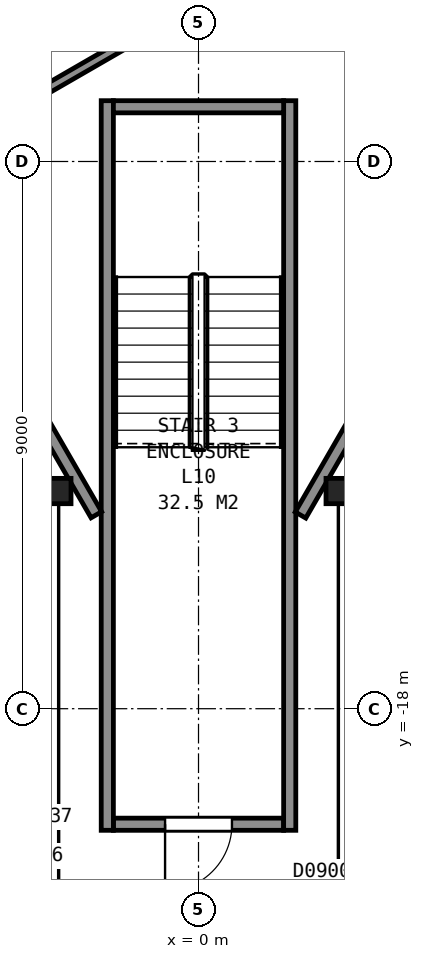
"""IFC4 building model, lengths in metres.
Left out: names, types, materials, properties, quantities, classifications, styles, units other than length and angle.
Written with IfcOpenShell. Run it as: python <this file> out.ifc"""

import sys

from ifc_helpers import new_model, si_unit, direction, frame, frame_2d, origin, origin_2d, place, context, subcontext, project, spatial, rectangle, i_section, extrude, element, fill, save


model = new_model("IFC4")
c1 = context("Model", 3, precision=1e-05, world=origin(), true_north=direction((0.0, 1.0)))
c2 = subcontext(c1, "Body", "Model", "MODEL_VIEW")
j1 = project(units=[si_unit("LENGTHUNIT", "METRE"), si_unit("PLANEANGLEUNIT", "RADIAN")], contexts=[c1])
p1 = place(None, origin())
s1 = spatial("IfcSite", under=j1, at=p1, CompositionType="ELEMENT")
p2 = place(p1, origin())
s2 = spatial("IfcBuilding", under=s1, at=p2, CompositionType="ELEMENT")
p3 = place(p2, frame((0.0, 0.0, 51.2)))
s3 = spatial("IfcBuildingStorey", under=s2, at=p3, CompositionType="ELEMENT", Elevation=51.2)
for number, where, z_axis, x_axis in (
    (1, (-2.3, -14.42, 0.0), (0.0, 0.0, 1.0), (1.0, 0.0, 0.0)),
    (2, (2.3, -14.42, 0.0), (0.0, 0.0, 1.0), (1.0, 0.0, 0.0)),
):
    element("IfcColumn", number, at=place(p3, frame(where, z_axis=z_axis, x_axis=x_axis)), inside=s3, PredefinedType="COLUMN", context=c2, shape_type="SweptSolid", body=[
        extrude(i_section(OverallWidth=0.406, OverallDepth=0.417, WebThickness=0.03, FlangeThickness=0.048, FilletRadius=0.015, at=origin_2d()), origin(), (0.0, 0.0, 1.0), 3.6),
    ])
p4 = place(p3, frame((-1.4, -19.9, 0.0), z_axis=(0.0, 0.0, 1.0), x_axis=(1.0, 0.0, 0.0)))
e3 = element("IfcWall", 3, at=p4, inside=s3, PredefinedType="PARTITIONING", context=c2, shape_type="SweptSolid", body=[
    extrude(rectangle(XDim=2.8, YDim=0.2, at=frame_2d((1.4, 0.0))), origin(), (0.0, 0.0, 1.0), 3.35),
])
p5 = place(p4, frame((0.85, 0.0, 0.0)))
e4 = element("IfcOpeningElement", 4, at=p5, cuts=e3, PredefinedType="OPENING", context=c2, shape_type="SweptSolid", body=[
    extrude(rectangle(XDim=1.1, YDim=2.1, at=frame_2d((0.55, 1.05))), frame((0.0, 0.11, 0.0), z_axis=(0.0, -1.0, 0.0), x_axis=(1.0, 0.0, 0.0)), (0.0, 0.0, 1.0), 0.22),
])
for number, where, z_axis, x_axis in (
    (5, (1.5, -8.0, 0.0), (0.0, 0.0, 1.0), (0.0, -1.0, 0.0)),
    (6, (-1.5, -8.0, 0.0), (0.0, 0.0, 1.0), (0.0, -1.0, 0.0)),
):
    element("IfcWall", number, at=place(p3, frame(where, z_axis=z_axis, x_axis=x_axis)), inside=s3, PredefinedType="PARTITIONING", context=c2, shape_type="SweptSolid", body=[
        extrude(rectangle(XDim=12.0, YDim=0.2, at=frame_2d((6.0, 0.0))), origin(), (0.0, 0.0, 1.0), 3.35),
    ])
p6 = place(p3, frame((-1.4, -8.1, 0.0), z_axis=(0.0, 0.0, 1.0), x_axis=(1.0, 0.0, 0.0)))
e7 = element("IfcWall", 7, at=p6, inside=s3, PredefinedType="PARTITIONING", context=c2, shape_type="SweptSolid", body=[
    extrude(rectangle(XDim=2.8, YDim=0.2, at=frame_2d((1.4, 0.0))), origin(), (0.0, 0.0, 1.0), 3.35),
])
p7 = place(p3, frame((-13.664, 5.946, 0.0), z_axis=(0.0, 0.0, 1.0), x_axis=(0.499994327219, -0.866028678941, 0.0)))
e8 = element("IfcWall", 8, at=p7, inside=s3, PredefinedType="PARTITIONING", context=c2, shape_type="SweptSolid", body=[
    extrude(rectangle(XDim=23.968, YDim=0.2, at=frame_2d((11.984, 0.0))), origin(), (0.0, 0.0, 1.0), 3.35),
])
p8 = place(p3, frame((-4.825, -9.154, 0.0), z_axis=(0.0, 0.0, 1.0), x_axis=(0.866023738697, 0.500002884005, 0.0)))
e9 = element("IfcWall", 9, at=p8, inside=s3, PredefinedType="PARTITIONING", context=c2, shape_type="SweptSolid", body=[
    extrude(rectangle(XDim=4.22, YDim=0.15, at=frame_2d((2.11, 0.0))), origin(), (0.0, 0.0, 1.0), 3.35),
])
p9 = place(p8, frame((1.595, 0.0, 0.0)))
e10 = element("IfcOpeningElement", 10, at=p9, cuts=e9, PredefinedType="OPENING", context=c2, shape_type="SweptSolid", body=[
    extrude(rectangle(XDim=0.9, YDim=2.1, at=frame_2d((0.45, 1.05))), frame((0.0, 0.085, 0.0), z_axis=(0.0, -1.0, 0.0), x_axis=(1.0, 0.0, 0.0)), (0.0, 0.0, 1.0), 0.17),
])
p10 = place(p3, frame((1.677, -14.815, 0.0), z_axis=(0.0, 0.0, 1.0), x_axis=(0.49999445743, 0.866028603765, 0.0)))
e11 = element("IfcWall", 11, at=p10, inside=s3, PredefinedType="PARTITIONING", context=c2, shape_type="SweptSolid", body=[
    extrude(rectangle(XDim=5.905, YDim=0.2, at=frame_2d((2.952, 0.0))), origin(), (0.0, 0.0, 1.0), 3.35),
])
p11 = place(p10, frame((3.855, 0.0, 0.0)))
e12 = element("IfcOpeningElement", 12, at=p11, cuts=e11, PredefinedType="OPENING", context=c2, shape_type="SweptSolid", body=[
    extrude(rectangle(XDim=1.8, YDim=2.1, at=frame_2d((0.9, 1.05))), frame((0.0, 0.11, 0.0), z_axis=(0.0, -1.0, 0.0), x_axis=(1.0, 0.0, 0.0)), (0.0, 0.0, 1.0), 0.22),
])
p12 = place(p5, origin())
e13 = element("IfcDoor", 13, at=p12, inside=s3, OperationType="SINGLE_SWING_LEFT", PredefinedType="DOOR", context=c2, shape_type="SweptSolid", body=[
    extrude(rectangle(XDim=1.1, YDim=2.1, at=frame_2d((0.55, 1.05))), frame((0.0, 0.025, 0.0), z_axis=(0.0, -1.0, 0.0), x_axis=(1.0, 0.0, 0.0)), (0.0, 0.0, 1.0), 0.05),
])
fill(e4, e13)
save(model, sys.argv[1])
